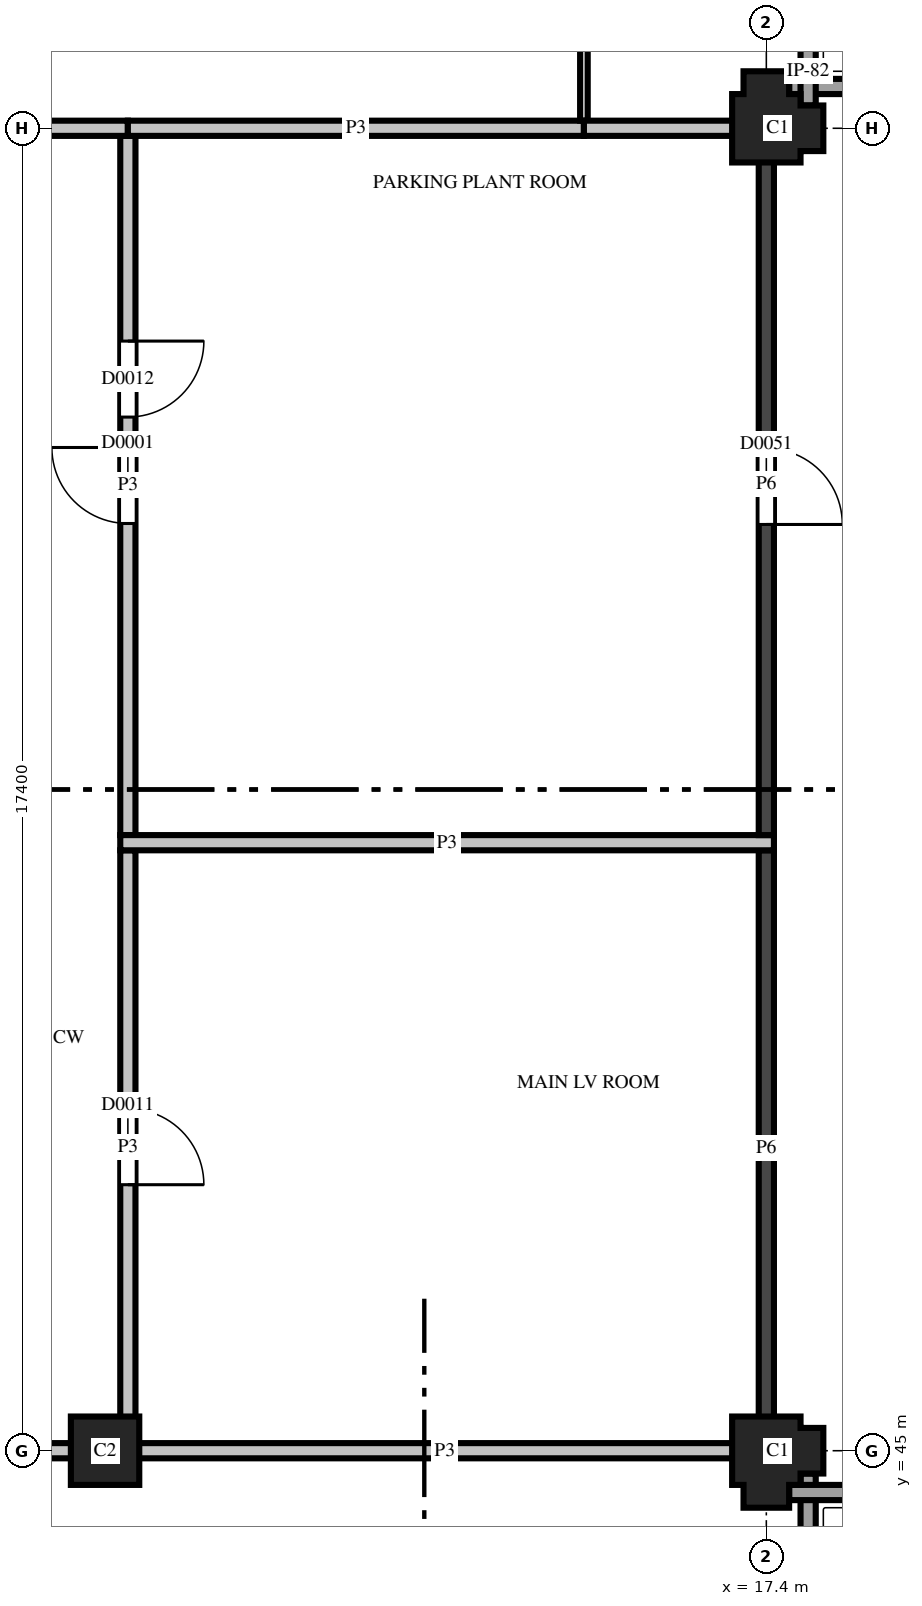
"""IFC4 building model, lengths in metres.
Left out: names, types, materials, properties, quantities, classifications, styles, units other than length and angle.
Written with IfcOpenShell. Run it as: python <this file> out.ifc"""

import sys

from ifc_helpers import new_model, si_unit, direction, frame, frame_2d, origin, place, context, subcontext, project, spatial, polyline, rectangle, outline, extrude, element, fill, save


model = new_model("IFC4")
c1 = context("Model", 3, precision=1e-05, world=origin(), true_north=direction((0.0, 1.0)))
c2 = subcontext(c1, "Body", "Model", "MODEL_VIEW")
j1 = project(units=[si_unit("LENGTHUNIT", "METRE"), si_unit("PLANEANGLEUNIT", "RADIAN")], contexts=[c1])
p1 = place(None, origin())
s1 = spatial("IfcSite", under=j1, at=p1, CompositionType="ELEMENT")
p2 = place(p1, origin())
s2 = spatial("IfcBuilding", under=s1, at=p2, CompositionType="ELEMENT")
p3 = place(p2, origin())
s3 = spatial("IfcBuildingStorey", under=s2, at=p3, CompositionType="ELEMENT", Elevation=0.0)
p4 = place(p3, frame((8.7, 45.0, 0.0), z_axis=(0.0, 0.0, 1.0), x_axis=(1.0, 0.0, 0.0)))
e1 = element("IfcColumn", 1, at=p4, inside=s3, PredefinedType="COLUMN", context=c2, shape_type="SweptSolid", body=[
    extrude(outline(polyline([(-0.45, -0.45), (0.45, -0.45), (0.45, 0.45), (-0.45, 0.45), (-0.45, -0.45)])), origin(), (0.0, 0.0, 1.0), 4.5),
])
for number, where, z_axis, x_axis in (
    (2, (17.4, 45.0, 0.0), (0.0, 0.0, 1.0), (0.0, -1.0, 0.0)),
    (3, (17.4, 62.4, 0.0), (0.0, 0.0, 1.0), (1.0, 0.0, 0.0)),
):
    element("IfcColumn", number, at=place(p3, frame(where, z_axis=z_axis, x_axis=x_axis)), inside=s3, PredefinedType="COLUMN", context=c2, shape_type="SweptSolid", body=[
        extrude(outline(polyline([(-0.45, -0.45), (0.45, -0.45), (0.45, -0.3), (0.75, -0.3), (0.75, 0.3), (0.45, 0.3), (0.45, 0.45), (0.3, 0.45), (0.3, 0.75), (-0.3, 0.75), (-0.3, 0.45), (-0.45, 0.45), (-0.45, -0.45)])), origin(), (0.0, 0.0, 1.0), 4.5),
    ])
p5 = place(p3, frame((17.95, 37.8, 0.0), z_axis=(0.0, 0.0, 1.0), x_axis=(0.0, 1.0, 0.0)))
e4 = element("IfcWall", 4, at=p5, inside=s3, PredefinedType="SOLIDWALL", context=c2, shape_type="SweptSolid", body=[
    extrude(outline(polyline([(0.0, 0.0), (6.9, 0.0), (6.9, 3.1), (6.002, 3.1), (6.0, 2.4), (5.681, 2.56), (5.363, 2.695), (5.044, 2.806), (4.725, 2.895), (4.406, 2.963), (4.087, 3.012), (3.769, 3.041), (3.45, 3.05), (3.131, 3.041), (2.812, 3.012), (2.494, 2.963), (2.175, 2.895), (1.856, 2.806), (1.538, 2.695), (1.219, 2.56), (0.9, 2.4), (0.898, 3.1), (0.0, 3.1), (0.0, 0.0)])), frame((0.0, 0.1, 0.0), z_axis=(0.0, -1.0, 0.0), x_axis=(1.0, 0.0, 0.0)), (0.0, 0.0, 1.0), 0.2),
])
p6 = place(p5, frame((3.0, 0.0, 2.4)))
e5 = element("IfcOpeningElement", 5, at=p6, cuts=e4, PredefinedType="OPENING", context=c2, shape_type="SweptSolid", body=[
    extrude(rectangle(XDim=0.9, YDim=0.531, at=frame_2d((0.45, 0.266))), frame((0.0, 0.11, 0.0), z_axis=(0.0, -1.0, 0.0), x_axis=(1.0, 0.0, 0.0)), (0.0, 0.0, 1.0), 0.22),
])
p7 = place(p3, frame((17.7, 44.45, 0.0), z_axis=(0.0, 0.0, 1.0), x_axis=(1.0, 0.0, 0.0)))
e6 = element("IfcWall", 6, at=p7, inside=s3, PredefinedType="SOLIDWALL", context=c2, shape_type="SweptSolid", body=[
    extrude(outline(polyline([(0.0, 0.0), (6.9, 0.0), (6.9, 3.1), (6.002, 3.1), (6.0, 2.4), (5.681, 2.56), (5.363, 2.695), (5.044, 2.806), (4.725, 2.895), (4.406, 2.963), (4.087, 3.012), (3.769, 3.041), (3.45, 3.05), (3.131, 3.041), (2.812, 3.012), (2.494, 2.963), (2.175, 2.895), (1.856, 2.806), (1.538, 2.695), (1.219, 2.56), (0.9, 2.4), (0.898, 3.1), (0.0, 3.1), (0.0, 0.0)])), frame((0.0, 0.1, 0.0), z_axis=(0.0, -1.0, 0.0), x_axis=(1.0, 0.0, 0.0)), (0.0, 0.0, 1.0), 0.2),
])
p8 = place(p7, frame((3.0, 0.0, 2.4)))
e7 = element("IfcOpeningElement", 7, at=p8, cuts=e6, PredefinedType="OPENING", context=c2, shape_type="SweptSolid", body=[
    extrude(rectangle(XDim=0.9, YDim=0.531, at=frame_2d((0.45, 0.266))), frame((0.0, 0.11, 0.0), z_axis=(0.0, -1.0, 0.0), x_axis=(1.0, 0.0, 0.0)), (0.0, 0.0, 1.0), 0.22),
])
p9 = place(p3, frame((24.6, 62.95, 0.0), z_axis=(0.0, 0.0, 1.0), x_axis=(-1.0, 0.0, 0.0)))
e8 = element("IfcWall", 8, at=p9, inside=s3, PredefinedType="SOLIDWALL", context=c2, shape_type="SweptSolid", body=[
    extrude(outline(polyline([(0.0, 0.0), (6.9, 0.0), (6.9, 3.1), (6.002, 3.1), (6.0, 2.4), (5.681, 2.56), (5.363, 2.695), (5.044, 2.806), (4.725, 2.895), (4.406, 2.963), (4.087, 3.012), (3.769, 3.041), (3.45, 3.05), (3.131, 3.041), (2.812, 3.012), (2.494, 2.963), (2.175, 2.895), (1.856, 2.806), (1.538, 2.695), (1.219, 2.56), (0.9, 2.4), (0.898, 3.1), (0.0, 3.1), (0.0, 0.0)])), frame((0.0, 0.1, 0.0), z_axis=(0.0, -1.0, 0.0), x_axis=(1.0, 0.0, 0.0)), (0.0, 0.0, 1.0), 0.2),
])
p10 = place(p9, frame((2.25, 0.0, 0.0)))
e9 = element("IfcOpeningElement", 9, at=p10, cuts=e8, PredefinedType="OPENING", context=c2, shape_type="SweptSolid", body=[
    extrude(rectangle(XDim=2.4, YDim=2.1, at=frame_2d((1.2, 1.05))), frame((0.0, 0.11, 0.0), z_axis=(0.0, -1.0, 0.0), x_axis=(1.0, 0.0, 0.0)), (0.0, 0.0, 1.0), 0.22),
])
p11 = place(p9, frame((2.25, 0.0, 2.25)))
e10 = element("IfcOpeningElement", 10, at=p11, cuts=e8, PredefinedType="OPENING", context=c2, shape_type="SweptSolid", body=[
    extrude(rectangle(XDim=2.4, YDim=0.563, at=frame_2d((1.2, 0.281))), frame((0.0, 0.11, 0.0), z_axis=(0.0, -1.0, 0.0), x_axis=(1.0, 0.0, 0.0)), (0.0, 0.0, 1.0), 0.22),
])
p12 = place(p3, frame((17.95, 62.7, 0.0), z_axis=(0.0, 0.0, 1.0), x_axis=(0.0, 1.0, 0.0)))
e11 = element("IfcWall", 11, at=p12, inside=s3, PredefinedType="SOLIDWALL", context=c2, shape_type="SweptSolid", body=[
    extrude(rectangle(XDim=0.9, YDim=0.2, at=frame_2d((0.45, 0.0))), origin(), (0.0, 0.0, 1.0), 3.1),
])
p13 = place(p3, frame((4.7, 45.0, 0.0), z_axis=(0.0, 0.0, 1.0), x_axis=(1.0, 0.0, 0.0)))
e12 = element("IfcWall", 12, at=p13, inside=s3, PredefinedType="PARTITIONING", context=c2, shape_type="SweptSolid", body=[
    extrude(rectangle(XDim=4.3, YDim=0.2, at=frame_2d((2.15, 0.0))), origin(), (0.0, 0.0, 1.0), 3.68),
])
p14 = place(p3, frame((9.0, 45.0, 0.0), z_axis=(0.0, 0.0, 1.0), x_axis=(1.0, 0.0, 0.0)))
e13 = element("IfcWall", 13, at=p14, inside=s3, PredefinedType="PARTITIONING", context=c2, shape_type="SweptSolid", body=[
    extrude(rectangle(XDim=8.34, YDim=0.2, at=frame_2d((4.17, 0.0))), origin(), (0.0, 0.0, 1.0), 3.68),
])
p15 = place(p3, frame((9.0, 45.1, 0.0), z_axis=(0.0, 0.0, 1.0), x_axis=(0.0, 1.0, 0.0)))
e14 = element("IfcWall", 14, at=p15, inside=s3, PredefinedType="PARTITIONING", context=c2, shape_type="SweptSolid", body=[
    extrude(rectangle(XDim=7.8, YDim=0.2, at=frame_2d((3.9, 0.0))), origin(), (0.0, 0.0, 1.0), 3.68),
])
p16 = place(p15, frame((3.4, 0.0, 0.0)))
e15 = element("IfcOpeningElement", 15, at=p16, cuts=e14, PredefinedType="OPENING", context=c2, shape_type="SweptSolid", body=[
    extrude(rectangle(XDim=1.0, YDim=2.1, at=frame_2d((0.5, 1.05))), frame((0.0, 0.11, 0.0), z_axis=(0.0, -1.0, 0.0), x_axis=(1.0, 0.0, 0.0)), (0.0, 0.0, 1.0), 0.22),
])
p17 = place(p3, frame((17.4, 45.06, 0.0), z_axis=(0.0, 0.0, 1.0), x_axis=(0.0, 1.0, 0.0)))
e16 = element("IfcWall", 16, at=p17, inside=s3, PredefinedType="PARTITIONING", context=c2, shape_type="SweptSolid", body=[
    extrude(rectangle(XDim=7.84, YDim=0.2, at=frame_2d((3.92, 0.0))), origin(), (0.0, 0.0, 1.0), 3.0),
])
p18 = place(p3, frame((9.0, 53.1, 0.0), z_axis=(0.0, 0.0, 1.0), x_axis=(0.0, 1.0, 0.0)))
e17 = element("IfcWall", 17, at=p18, inside=s3, PredefinedType="PARTITIONING", context=c2, shape_type="SweptSolid", body=[
    extrude(rectangle(XDim=9.2, YDim=0.2, at=frame_2d((4.6, 0.0))), origin(), (0.0, 0.0, 1.0), 3.68),
])
p19 = place(p18, frame((4.1, 0.0, 0.0)))
e18 = element("IfcOpeningElement", 18, at=p19, cuts=e17, PredefinedType="OPENING", context=c2, shape_type="SweptSolid", body=[
    extrude(rectangle(XDim=1.0, YDim=2.1, at=frame_2d((0.5, 1.05))), frame((0.0, 0.11, 0.0), z_axis=(0.0, -1.0, 0.0), x_axis=(1.0, 0.0, 0.0)), (0.0, 0.0, 1.0), 0.22),
])
p20 = place(p18, frame((5.5, 0.0, 0.0)))
e19 = element("IfcOpeningElement", 19, at=p20, cuts=e17, PredefinedType="OPENING", context=c2, shape_type="SweptSolid", body=[
    extrude(rectangle(XDim=1.0, YDim=2.1, at=frame_2d((0.5, 1.05))), frame((0.0, 0.11, 0.0), z_axis=(0.0, -1.0, 0.0), x_axis=(1.0, 0.0, 0.0)), (0.0, 0.0, 1.0), 0.22),
])
p21 = place(p3, frame((17.5, 53.0, 0.0), z_axis=(0.0, 0.0, 1.0), x_axis=(-1.0, 0.0, 0.0)))
e20 = element("IfcWall", 20, at=p21, inside=s3, PredefinedType="PARTITIONING", context=c2, shape_type="SweptSolid", body=[
    extrude(rectangle(XDim=8.6, YDim=0.2, at=frame_2d((4.3, 0.0))), origin(), (0.0, 0.0, 1.0), 3.68),
])
p22 = place(p3, frame((17.4, 53.1, 0.0), z_axis=(0.0, 0.0, 1.0), x_axis=(0.0, 1.0, 0.0)))
e21 = element("IfcWall", 21, at=p22, inside=s3, PredefinedType="PARTITIONING", context=c2, shape_type="SweptSolid", body=[
    extrude(rectangle(XDim=9.24, YDim=0.2, at=frame_2d((4.62, 0.0))), origin(), (0.0, 0.0, 1.0), 3.0),
])
p23 = place(p22, frame((4.087, 0.0, 0.0)))
e22 = element("IfcOpeningElement", 22, at=p23, cuts=e21, PredefinedType="OPENING", context=c2, shape_type="SweptSolid", body=[
    extrude(rectangle(XDim=1.0, YDim=2.1, at=frame_2d((0.5, 1.05))), frame((0.0, 0.11, 0.0), z_axis=(0.0, -1.0, 0.0), x_axis=(1.0, 0.0, 0.0)), (0.0, 0.0, 1.0), 0.22),
])
p24 = place(p3, frame((9.0, 62.4, 0.0), z_axis=(0.0, 0.0, 1.0), x_axis=(-1.0, 0.0, 0.0)))
e23 = element("IfcWall", 23, at=p24, inside=s3, PredefinedType="PARTITIONING", context=c2, shape_type="SweptSolid", body=[
    extrude(rectangle(XDim=4.2, YDim=0.2, at=frame_2d((2.1, 0.0))), origin(), (0.0, 0.0, 1.0), 3.68),
])
p25 = place(p3, frame((15.0, 62.4, 0.0), z_axis=(0.0, 0.0, 1.0), x_axis=(-1.0, 0.0, 0.0)))
e24 = element("IfcWall", 24, at=p25, inside=s3, PredefinedType="PARTITIONING", context=c2, shape_type="SweptSolid", body=[
    extrude(rectangle(XDim=6.0, YDim=0.2, at=frame_2d((3.0, 0.0))), origin(), (0.0, 0.0, 1.0), 3.68),
])
p26 = place(p3, frame((15.0, 62.5, 0.0), z_axis=(0.0, 0.0, 1.0), x_axis=(0.0, 1.0, 0.0)))
e25 = element("IfcWall", 25, at=p26, inside=s3, PredefinedType="PARTITIONING", context=c2, shape_type="SweptSolid", body=[
    extrude(rectangle(XDim=22.35, YDim=0.1, at=frame_2d((11.175, 0.0))), origin(), (0.0, 0.0, 1.0), 3.68),
])
p27 = place(p26, frame((10.725, 0.0, 0.0)))
e26 = element("IfcOpeningElement", 26, at=p27, cuts=e25, PredefinedType="OPENING", context=c2, shape_type="SweptSolid", body=[
    extrude(rectangle(XDim=0.9, YDim=2.1, at=frame_2d((0.45, 1.05))), frame((0.0, 0.06, 0.0), z_axis=(0.0, -1.0, 0.0), x_axis=(1.0, 0.0, 0.0)), (0.0, 0.0, 1.0), 0.12),
])
p28 = place(p3, frame((17.34, 62.4, 0.0), z_axis=(0.0, 0.0, 1.0), x_axis=(-1.0, 0.0, 0.0)))
e27 = element("IfcWall", 27, at=p28, inside=s3, PredefinedType="PARTITIONING", context=c2, shape_type="SweptSolid", body=[
    extrude(rectangle(XDim=2.34, YDim=0.2, at=frame_2d((1.17, 0.0))), origin(), (0.0, 0.0, 1.0), 3.68),
])
p29 = place(p19, origin())
e28 = element("IfcDoor", 28, at=p29, inside=s3, OperationType="SINGLE_SWING_LEFT", PredefinedType="DOOR", context=c2, shape_type="SweptSolid", body=[
    extrude(rectangle(XDim=1.0, YDim=2.1, at=frame_2d((0.5, 1.05))), frame((0.0, 0.025, 0.0), z_axis=(0.0, -1.0, 0.0), x_axis=(1.0, 0.0, 0.0)), (0.0, 0.0, 1.0), 0.05),
])
fill(e18, e28)
p30 = place(p16, origin())
e29 = element("IfcDoor", 29, at=p30, inside=s3, OperationType="SINGLE_SWING_LEFT", PredefinedType="DOOR", context=c2, shape_type="SweptSolid", body=[
    extrude(rectangle(XDim=1.0, YDim=2.1, at=frame_2d((0.5, 1.05))), frame((0.0, 0.025, 0.0), z_axis=(0.0, -1.0, 0.0), x_axis=(1.0, 0.0, 0.0)), (0.0, 0.0, 1.0), 0.05),
])
fill(e15, e29)
p31 = place(p20, origin())
e30 = element("IfcDoor", 30, at=p31, inside=s3, OperationType="SINGLE_SWING_RIGHT", PredefinedType="DOOR", context=c2, shape_type="SweptSolid", body=[
    extrude(rectangle(XDim=1.0, YDim=2.1, at=frame_2d((0.5, 1.05))), frame((0.0, 0.025, 0.0), z_axis=(0.0, -1.0, 0.0), x_axis=(1.0, 0.0, 0.0)), (0.0, 0.0, 1.0), 0.05),
])
fill(e19, e30)
p32 = place(p23, origin())
e31 = element("IfcDoor", 31, at=p32, inside=s3, OperationType="SINGLE_SWING_LEFT", PredefinedType="DOOR", context=c2, shape_type="SweptSolid", body=[
    extrude(rectangle(XDim=1.0, YDim=2.1, at=frame_2d((0.5, 1.05))), frame((0.0, 0.025, 0.0), z_axis=(0.0, -1.0, 0.0), x_axis=(1.0, 0.0, 0.0)), (0.0, 0.0, 1.0), 0.05),
])
fill(e22, e31)
save(model, sys.argv[1])
